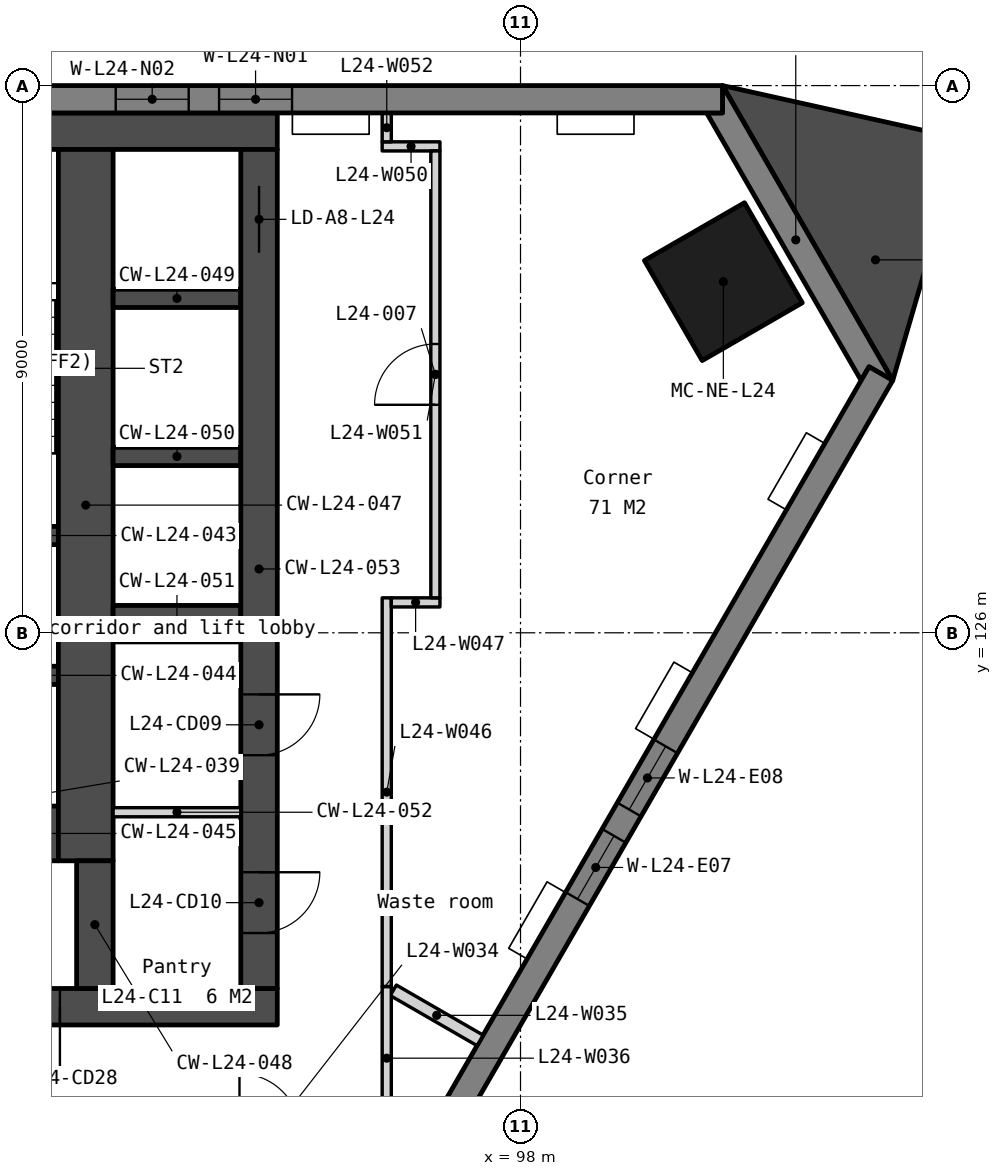
"""IFC4 building model, lengths in metres.
Left out: names, types, materials, properties, quantities, classifications, styles, units other than length and angle.
Written with IfcOpenShell. Run it as: python <this file> out.ifc"""

import sys

from ifc_helpers import new_model, si_unit, direction, frame, frame_2d, origin, origin_2d, place, context, subcontext, project, spatial, polyline, rectangle, outline, extrude, element, fill, save


model = new_model("IFC4")
c1 = context("Model", 3, precision=1e-05, world=origin(), true_north=direction((0.0, 1.0)))
c2 = subcontext(c1, "Body", "Model", "MODEL_VIEW")
j1 = project(units=[si_unit("LENGTHUNIT", "METRE"), si_unit("PLANEANGLEUNIT", "RADIAN")], contexts=[c1])
p1 = place(None, origin())
s1 = spatial("IfcSite", under=j1, at=p1, CompositionType="ELEMENT")
p2 = place(p1, origin())
s2 = spatial("IfcBuilding", under=s1, at=p2, CompositionType="ELEMENT")
p3 = place(p2, frame((0.0, 0.0, 99.3)))
s3 = spatial("IfcBuildingStorey", under=s2, at=p3, CompositionType="ELEMENT", Elevation=99.3)
p4 = place(p3, frame((101.336, 131.775, 0.0), z_axis=(0.0, 0.0, 1.0), x_axis=(-0.5, 0.866025403784, 0.0)))
e1 = element("IfcColumn", 1, at=p4, inside=s3, PredefinedType="COLUMN", context=c2, shape_type="SweptSolid", body=[
    extrude(rectangle(XDim=1.9, YDim=1.9, at=origin_2d()), origin(), (0.0, 0.0, 1.0), 3.5),
])
p5 = place(p3, frame((66.0, 134.25, 0.0), z_axis=(0.0, 0.0, 1.0), x_axis=(1.0, 0.0, 0.0)))
e2 = element("IfcWall", 2, at=p5, inside=s3, PredefinedType="SOLIDWALL", context=c2, shape_type="SweptSolid", body=[
    extrude(rectangle(XDim=28.0, YDim=0.6, at=frame_2d((14.0, 0.0))), origin(), (0.0, 0.0, 1.0), 3.35),
])
p6 = place(p3, frame((66.0, 119.85, 0.0), z_axis=(0.0, 0.0, 1.0), x_axis=(1.0, 0.0, 0.0)))
e3 = element("IfcWall", 3, at=p6, inside=s3, PredefinedType="SOLIDWALL", context=c2, shape_type="SweptSolid", body=[
    extrude(rectangle(XDim=28.0, YDim=0.6, at=frame_2d((14.0, 0.0))), origin(), (0.0, 0.0, 1.0), 3.35),
])
p7 = place(p6, frame((6.825, 0.0, 0.0)))
e4 = element("IfcOpeningElement", 4, at=p7, cuts=e3, PredefinedType="OPENING", context=c2, shape_type="SweptSolid", body=[
    extrude(rectangle(XDim=1.8, YDim=2.1, at=frame_2d((0.9, 1.05))), frame((0.0, 0.31, 0.0), z_axis=(0.0, -1.0, 0.0), x_axis=(1.0, 0.0, 0.0)), (0.0, 0.0, 1.0), 0.62),
])
p8 = place(p6, frame((15.85, 0.0, 0.0)))
e5 = element("IfcOpeningElement", 5, at=p8, cuts=e3, PredefinedType="OPENING", context=c2, shape_type="SweptSolid", body=[
    extrude(rectangle(XDim=1.5, YDim=2.1, at=frame_2d((0.75, 1.05))), frame((0.0, 0.31, 0.0), z_axis=(0.0, -1.0, 0.0), x_axis=(1.0, 0.0, 0.0)), (0.0, 0.0, 1.0), 0.62),
])
p9 = place(p6, frame((19.375, 0.0, 0.0)))
e6 = element("IfcOpeningElement", 6, at=p9, cuts=e3, PredefinedType="OPENING", context=c2, shape_type="SweptSolid", body=[
    extrude(rectangle(XDim=1.8, YDim=2.1, at=frame_2d((0.9, 1.05))), frame((0.0, 0.31, 0.0), z_axis=(0.0, -1.0, 0.0), x_axis=(1.0, 0.0, 0.0)), (0.0, 0.0, 1.0), 0.62),
])
p10 = place(p6, frame((4.425, 0.0, 0.0)))
e7 = element("IfcOpeningElement", 7, at=p10, cuts=e3, PredefinedType="OPENING", context=c2, shape_type="SweptSolid", body=[
    extrude(rectangle(XDim=1.0, YDim=2.1, at=frame_2d((0.5, 1.05))), frame((0.0, 0.31, 0.0), z_axis=(0.0, -1.0, 0.0), x_axis=(1.0, 0.0, 0.0)), (0.0, 0.0, 1.0), 0.62),
])
p11 = place(p6, frame((9.925, 0.0, 0.0)))
e8 = element("IfcOpeningElement", 8, at=p11, cuts=e3, PredefinedType="OPENING", context=c2, shape_type="SweptSolid", body=[
    extrude(rectangle(XDim=1.0, YDim=2.1, at=frame_2d((0.5, 1.05))), frame((0.0, 0.31, 0.0), z_axis=(0.0, -1.0, 0.0), x_axis=(1.0, 0.0, 0.0)), (0.0, 0.0, 1.0), 0.62),
])
p12 = place(p6, frame((13.125, 0.0, 0.0)))
e9 = element("IfcOpeningElement", 9, at=p12, cuts=e3, PredefinedType="OPENING", context=c2, shape_type="SweptSolid", body=[
    extrude(rectangle(XDim=1.0, YDim=2.1, at=frame_2d((0.5, 1.05))), frame((0.0, 0.31, 0.0), z_axis=(0.0, -1.0, 0.0), x_axis=(1.0, 0.0, 0.0)), (0.0, 0.0, 1.0), 0.62),
])
p13 = place(p6, frame((21.725, 0.0, 0.0)))
e10 = element("IfcOpeningElement", 10, at=p13, cuts=e3, PredefinedType="OPENING", context=c2, shape_type="SweptSolid", body=[
    extrude(rectangle(XDim=1.0, YDim=2.1, at=frame_2d((0.5, 1.05))), frame((0.0, 0.31, 0.0), z_axis=(0.0, -1.0, 0.0), x_axis=(1.0, 0.0, 0.0)), (0.0, 0.0, 1.0), 0.62),
])
p14 = place(p6, frame((23.425, 0.0, 0.0)))
e11 = element("IfcOpeningElement", 11, at=p14, cuts=e3, PredefinedType="OPENING", context=c2, shape_type="SweptSolid", body=[
    extrude(rectangle(XDim=1.0, YDim=2.1, at=frame_2d((0.5, 1.05))), frame((0.0, 0.31, 0.0), z_axis=(0.0, -1.0, 0.0), x_axis=(1.0, 0.0, 0.0)), (0.0, 0.0, 1.0), 0.62),
])
for number, where, z_axis, x_axis in (
    (12, (87.85, 127.6, 0.0), (0.0, 0.0, 1.0), (1.0, 0.0, 0.0)),
    (13, (87.85, 125.3, 0.0), (0.0, 0.0, 1.0), (1.0, 0.0, 0.0)),
):
    element("IfcWall", number, at=place(p3, frame(where, z_axis=z_axis, x_axis=x_axis)), inside=s3, PredefinedType="SOLIDWALL", context=c2, shape_type="SweptSolid", body=[
        extrude(rectangle(XDim=2.55, YDim=0.3, at=frame_2d((1.275, 0.0))), origin(), (0.0, 0.0, 1.0), 3.35),
    ])
p15 = place(p3, frame((87.85, 122.7, 0.0), z_axis=(0.0, 0.0, 1.0), x_axis=(1.0, 0.0, 0.0)))
e14 = element("IfcWall", 14, at=p15, inside=s3, PredefinedType="SOLIDWALL", context=c2, shape_type="SweptSolid", body=[
    extrude(rectangle(XDim=2.55, YDim=0.9, at=frame_2d((1.275, 0.0))), origin(), (0.0, 0.0, 1.0), 3.35),
])
p16 = place(p3, frame((90.85, 133.95, 0.0), z_axis=(0.0, 0.0, 1.0), x_axis=(0.0, -1.0, 0.0)))
e15 = element("IfcWall", 15, at=p16, inside=s3, PredefinedType="SOLIDWALL", context=c2, shape_type="SweptSolid", body=[
    extrude(rectangle(XDim=11.7, YDim=0.9, at=frame_2d((5.85, 0.0))), origin(), (0.0, 0.0, 1.0), 3.35),
])
p17 = place(p3, frame((91.0, 122.25, 0.0), z_axis=(0.0, 0.0, 1.0), x_axis=(0.0, -1.0, 0.0)))
e16 = element("IfcWall", 16, at=p17, inside=s3, PredefinedType="SOLIDWALL", context=c2, shape_type="SweptSolid", body=[
    extrude(rectangle(XDim=2.1, YDim=0.6, at=frame_2d((1.05, 0.0))), origin(), (0.0, 0.0, 1.0), 3.35),
])
for number, where, z_axis, x_axis in (
    (17, (91.3, 131.5, 0.0), (0.0, 0.0, 1.0), (1.0, 0.0, 0.0)),
    (18, (91.3, 128.9, 0.0), (0.0, 0.0, 1.0), (1.0, 0.0, 0.0)),
):
    element("IfcWall", number, at=place(p3, frame(where, z_axis=z_axis, x_axis=x_axis)), inside=s3, PredefinedType="SOLIDWALL", context=c2, shape_type="SweptSolid", body=[
        extrude(rectangle(XDim=2.1, YDim=0.3, at=frame_2d((1.05, 0.0))), origin(), (0.0, 0.0, 1.0), 3.35),
    ])
p18 = place(p3, frame((91.3, 126.15, 0.0), z_axis=(0.0, 0.0, 1.0), x_axis=(1.0, 0.0, 0.0)))
e19 = element("IfcWall", 19, at=p18, inside=s3, PredefinedType="SOLIDWALL", context=c2, shape_type="SweptSolid", body=[
    extrude(rectangle(XDim=2.1, YDim=0.6, at=frame_2d((1.05, 0.0))), origin(), (0.0, 0.0, 1.0), 3.35),
])
p19 = place(p3, frame((91.3, 123.049, 0.0), z_axis=(0.0, 0.0, 1.0), x_axis=(1.0, 0.0, 0.0)))
e20 = element("IfcWall", 20, at=p19, inside=s3, PredefinedType="PARTITIONING", context=c2, shape_type="SweptSolid", body=[
    extrude(rectangle(XDim=2.1, YDim=0.15, at=frame_2d((1.05, 0.0))), origin(), (0.0, 0.0, 1.0), 3.35),
])
p20 = place(p3, frame((93.7, 133.95, 0.0), z_axis=(0.0, 0.0, 1.0), x_axis=(0.0, -1.0, 0.0)))
e21 = element("IfcWall", 21, at=p20, inside=s3, PredefinedType="SOLIDWALL", context=c2, shape_type="SweptSolid", body=[
    extrude(rectangle(XDim=13.8, YDim=0.6, at=frame_2d((6.9, 0.0))), origin(), (0.0, 0.0, 1.0), 3.35),
])
p21 = place(p20, frame((0.6, 0.0, 0.0)))
e22 = element("IfcOpeningElement", 22, at=p21, cuts=e21, PredefinedType="OPENING", context=c2, shape_type="SweptSolid", body=[
    extrude(rectangle(XDim=1.1, YDim=2.1, at=frame_2d((0.55, 1.05))), frame((0.0, 0.31, 0.0), z_axis=(0.0, -1.0, 0.0), x_axis=(1.0, 0.0, 0.0)), (0.0, 0.0, 1.0), 0.62),
])
p22 = place(p20, frame((8.963, 0.0, 0.0)))
e23 = element("IfcOpeningElement", 23, at=p22, cuts=e21, PredefinedType="OPENING", context=c2, shape_type="SweptSolid", body=[
    extrude(rectangle(XDim=1.0, YDim=2.1, at=frame_2d((0.5, 1.05))), frame((0.0, 0.31, 0.0), z_axis=(0.0, -1.0, 0.0), x_axis=(1.0, 0.0, 0.0)), (0.0, 0.0, 1.0), 0.62),
])
p23 = place(p20, frame((11.888, 0.0, 0.0)))
e24 = element("IfcOpeningElement", 24, at=p23, cuts=e21, PredefinedType="OPENING", context=c2, shape_type="SweptSolid", body=[
    extrude(rectangle(XDim=1.0, YDim=2.1, at=frame_2d((0.5, 1.05))), frame((0.0, 0.31, 0.0), z_axis=(0.0, -1.0, 0.0), x_axis=(1.0, 0.0, 0.0)), (0.0, 0.0, 1.0), 0.62),
])
p24 = place(p3, frame((0.0, 0.0, -0.15)))
e25 = element("IfcWall", 25, at=p24, inside=s3, PredefinedType="SOLIDWALL", context=c2, shape_type="SweptSolid", body=[
    extrude(outline(polyline([(104.122, 130.15), (103.732, 130.375), (103.602, 130.15), (101.062, 134.55), (101.322, 134.55), (101.322, 135.0), (104.122, 130.15)])), origin(), (0.0, 0.0, 1.0), 3.5),
])
p25 = place(p3, frame((101.322, 134.775, -0.15), z_axis=(0.0, 0.0, 1.0), x_axis=(-1.0, 0.0, 0.0)))
e26 = element("IfcWall", 26, at=p25, inside=s3, PredefinedType="SOLIDWALL", context=c2, shape_type="SweptSolid", body=[
    extrude(outline(polyline([(42.643, 0.0), (42.643, 3.5), (0.0, 3.5), (0.0, 0.0), (42.643, 0.0)])), frame((0.0, 0.225, 0.0), z_axis=(0.0, -1.0, 0.0), x_axis=(1.0, 0.0, 0.0)), (0.0, 0.0, 1.0), 0.45),
])
p26 = place(p25, frame((7.079, 0.0, 1.05)))
e27 = element("IfcOpeningElement", 27, at=p26, cuts=e26, PredefinedType="OPENING", context=c2, shape_type="SweptSolid", body=[
    extrude(rectangle(XDim=1.2, YDim=1.5, at=frame_2d((0.6, 0.75))), frame((0.0, 0.235, 0.0), z_axis=(0.0, -1.0, 0.0), x_axis=(1.0, 0.0, 0.0)), (0.0, 0.0, 1.0), 0.47),
])
p27 = place(p25, frame((8.779, 0.0, 1.05)))
e28 = element("IfcOpeningElement", 28, at=p27, cuts=e26, PredefinedType="OPENING", context=c2, shape_type="SweptSolid", body=[
    extrude(rectangle(XDim=1.2, YDim=1.5, at=frame_2d((0.6, 0.75))), frame((0.0, 0.235, 0.0), z_axis=(0.0, -1.0, 0.0), x_axis=(1.0, 0.0, 0.0)), (0.0, 0.0, 1.0), 0.47),
])
p28 = place(p25, frame((15.607, 0.0, 1.05)))
e29 = element("IfcOpeningElement", 29, at=p28, cuts=e26, PredefinedType="OPENING", context=c2, shape_type="SweptSolid", body=[
    extrude(rectangle(XDim=1.2, YDim=1.5, at=frame_2d((0.6, 0.75))), frame((0.0, 0.235, 0.0), z_axis=(0.0, -1.0, 0.0), x_axis=(1.0, 0.0, 0.0)), (0.0, 0.0, 1.0), 0.47),
])
p29 = place(p25, frame((17.307, 0.0, 1.05)))
e30 = element("IfcOpeningElement", 30, at=p29, cuts=e26, PredefinedType="OPENING", context=c2, shape_type="SweptSolid", body=[
    extrude(rectangle(XDim=1.2, YDim=1.5, at=frame_2d((0.6, 0.75))), frame((0.0, 0.235, 0.0), z_axis=(0.0, -1.0, 0.0), x_axis=(1.0, 0.0, 0.0)), (0.0, 0.0, 1.0), 0.47),
])
p30 = place(p25, frame((24.136, 0.0, 1.05)))
e31 = element("IfcOpeningElement", 31, at=p30, cuts=e26, PredefinedType="OPENING", context=c2, shape_type="SweptSolid", body=[
    extrude(rectangle(XDim=1.2, YDim=1.5, at=frame_2d((0.6, 0.75))), frame((0.0, 0.235, 0.0), z_axis=(0.0, -1.0, 0.0), x_axis=(1.0, 0.0, 0.0)), (0.0, 0.0, 1.0), 0.47),
])
p31 = place(p25, frame((25.836, 0.0, 1.05)))
e32 = element("IfcOpeningElement", 32, at=p31, cuts=e26, PredefinedType="OPENING", context=c2, shape_type="SweptSolid", body=[
    extrude(rectangle(XDim=1.2, YDim=1.5, at=frame_2d((0.6, 0.75))), frame((0.0, 0.235, 0.0), z_axis=(0.0, -1.0, 0.0), x_axis=(1.0, 0.0, 0.0)), (0.0, 0.0, 1.0), 0.47),
])
p32 = place(p25, frame((32.665, 0.0, 1.05)))
e33 = element("IfcOpeningElement", 33, at=p32, cuts=e26, PredefinedType="OPENING", context=c2, shape_type="SweptSolid", body=[
    extrude(rectangle(XDim=1.2, YDim=1.5, at=frame_2d((0.6, 0.75))), frame((0.0, 0.235, 0.0), z_axis=(0.0, -1.0, 0.0), x_axis=(1.0, 0.0, 0.0)), (0.0, 0.0, 1.0), 0.47),
])
p33 = place(p25, frame((34.365, 0.0, 1.05)))
e34 = element("IfcOpeningElement", 34, at=p33, cuts=e26, PredefinedType="OPENING", context=c2, shape_type="SweptSolid", body=[
    extrude(rectangle(XDim=1.2, YDim=1.5, at=frame_2d((0.6, 0.75))), frame((0.0, 0.235, 0.0), z_axis=(0.0, -1.0, 0.0), x_axis=(1.0, 0.0, 0.0)), (0.0, 0.0, 1.0), 0.47),
])
p34 = place(p3, frame((82.605, 93.333, -0.15), z_axis=(0.0, 0.0, 1.0), x_axis=(0.500000478905, 0.866025127289, 0.0)))
e35 = element("IfcWall", 35, at=p34, inside=s3, PredefinedType="SOLIDWALL", context=c2, shape_type="SweptSolid", body=[
    extrude(outline(polyline([(42.643, 0.0), (42.643, 3.5), (0.0, 3.5), (0.0, 0.0), (42.643, 0.0)])), frame((0.0, 0.225, 0.0), z_axis=(0.0, -1.0, 0.0), x_axis=(1.0, 0.0, 0.0)), (0.0, 0.0, 1.0), 0.45),
])
p35 = place(p34, frame((7.079, 0.0, 1.05)))
e36 = element("IfcOpeningElement", 36, at=p35, cuts=e35, PredefinedType="OPENING", context=c2, shape_type="SweptSolid", body=[
    extrude(rectangle(XDim=1.2, YDim=1.5, at=frame_2d((0.6, 0.75))), frame((0.0, 0.235, 0.0), z_axis=(0.0, -1.0, 0.0), x_axis=(1.0, 0.0, 0.0)), (0.0, 0.0, 1.0), 0.47),
])
p36 = place(p34, frame((8.779, 0.0, 1.05)))
e37 = element("IfcOpeningElement", 37, at=p36, cuts=e35, PredefinedType="OPENING", context=c2, shape_type="SweptSolid", body=[
    extrude(rectangle(XDim=1.2, YDim=1.5, at=frame_2d((0.6, 0.75))), frame((0.0, 0.235, 0.0), z_axis=(0.0, -1.0, 0.0), x_axis=(1.0, 0.0, 0.0)), (0.0, 0.0, 1.0), 0.47),
])
p37 = place(p34, frame((15.607, 0.0, 1.05)))
e38 = element("IfcOpeningElement", 38, at=p37, cuts=e35, PredefinedType="OPENING", context=c2, shape_type="SweptSolid", body=[
    extrude(rectangle(XDim=1.2, YDim=1.5, at=frame_2d((0.6, 0.75))), frame((0.0, 0.235, 0.0), z_axis=(0.0, -1.0, 0.0), x_axis=(1.0, 0.0, 0.0)), (0.0, 0.0, 1.0), 0.47),
])
p38 = place(p34, frame((17.307, 0.0, 1.05)))
e39 = element("IfcOpeningElement", 39, at=p38, cuts=e35, PredefinedType="OPENING", context=c2, shape_type="SweptSolid", body=[
    extrude(rectangle(XDim=1.2, YDim=1.5, at=frame_2d((0.6, 0.75))), frame((0.0, 0.235, 0.0), z_axis=(0.0, -1.0, 0.0), x_axis=(1.0, 0.0, 0.0)), (0.0, 0.0, 1.0), 0.47),
])
p39 = place(p34, frame((24.136, 0.0, 1.05)))
e40 = element("IfcOpeningElement", 40, at=p39, cuts=e35, PredefinedType="OPENING", context=c2, shape_type="SweptSolid", body=[
    extrude(rectangle(XDim=1.2, YDim=1.5, at=frame_2d((0.6, 0.75))), frame((0.0, 0.235, 0.0), z_axis=(0.0, -1.0, 0.0), x_axis=(1.0, 0.0, 0.0)), (0.0, 0.0, 1.0), 0.47),
])
p40 = place(p34, frame((25.836, 0.0, 1.05)))
e41 = element("IfcOpeningElement", 41, at=p40, cuts=e35, PredefinedType="OPENING", context=c2, shape_type="SweptSolid", body=[
    extrude(rectangle(XDim=1.2, YDim=1.5, at=frame_2d((0.6, 0.75))), frame((0.0, 0.235, 0.0), z_axis=(0.0, -1.0, 0.0), x_axis=(1.0, 0.0, 0.0)), (0.0, 0.0, 1.0), 0.47),
])
p41 = place(p34, frame((32.665, 0.0, 1.05)))
e42 = element("IfcOpeningElement", 42, at=p41, cuts=e35, PredefinedType="OPENING", context=c2, shape_type="SweptSolid", body=[
    extrude(rectangle(XDim=1.2, YDim=1.5, at=frame_2d((0.6, 0.75))), frame((0.0, 0.235, 0.0), z_axis=(0.0, -1.0, 0.0), x_axis=(1.0, 0.0, 0.0)), (0.0, 0.0, 1.0), 0.47),
])
p42 = place(p34, frame((34.365, 0.0, 1.05)))
e43 = element("IfcOpeningElement", 43, at=p42, cuts=e35, PredefinedType="OPENING", context=c2, shape_type="SweptSolid", body=[
    extrude(rectangle(XDim=1.2, YDim=1.5, at=frame_2d((0.6, 0.75))), frame((0.0, 0.235, 0.0), z_axis=(0.0, -1.0, 0.0), x_axis=(1.0, 0.0, 0.0)), (0.0, 0.0, 1.0), 0.47),
])
p43 = place(p3, frame((0.0, 0.0, -0.15)))
e44 = element("IfcWall", 44, at=p43, inside=s3, PredefinedType="SOLIDWALL", context=c2, shape_type="SweptSolid", body=[
    extrude(outline(polyline([(104.122, 130.15), (105.279, 134.117), (101.322, 135.0), (104.122, 130.15)])), origin(), (0.0, 0.0, 1.0), 3.5),
])
p44 = place(p3, frame((95.908, 120.12, 0.0), z_axis=(0.0, 0.0, 1.0), x_axis=(0.866101713734, -0.499867803992, 0.0)))
e45 = element("IfcWall", 45, at=p44, inside=s3, PredefinedType="PARTITIONING", context=c2, shape_type="SweptSolid", body=[
    extrude(rectangle(XDim=1.648, YDim=0.2, at=frame_2d((0.824, 0.0))), origin(), (0.0, 0.0, 1.0), 3.35),
])
p45 = place(p3, frame((95.8, 117.825, 0.0), z_axis=(0.0, 0.0, 1.0), x_axis=(0.0, 1.0, 0.0)))
e46 = element("IfcWall", 46, at=p45, inside=s3, PredefinedType="PARTITIONING", context=c2, shape_type="SweptSolid", body=[
    extrude(rectangle(XDim=2.358, YDim=0.15, at=frame_2d((1.179, 0.0))), origin(), (0.0, 0.0, 1.0), 3.35),
])
p46 = place(p3, frame((95.8, 120.183, 0.0), z_axis=(0.0, 0.0, 1.0), x_axis=(0.0, 1.0, 0.0)))
e47 = element("IfcWall", 47, at=p46, inside=s3, PredefinedType="PARTITIONING", context=c2, shape_type="SweptSolid", body=[
    extrude(rectangle(XDim=6.392, YDim=0.15, at=frame_2d((3.196, 0.0))), origin(), (0.0, 0.0, 1.0), 3.35),
])
p47 = place(p3, frame((95.875, 126.5, 0.0), z_axis=(0.0, 0.0, 1.0), x_axis=(1.0, 0.0, 0.0)))
e48 = element("IfcWall", 48, at=p47, inside=s3, PredefinedType="PARTITIONING", context=c2, shape_type="SweptSolid", body=[
    extrude(rectangle(XDim=0.8, YDim=0.15, at=frame_2d((0.4, 0.0))), origin(), (0.0, 0.0, 1.0), 3.35),
])
p48 = place(p3, frame((95.725, 134.0, 0.0), z_axis=(0.0, 0.0, 1.0), x_axis=(1.0, 0.0, 0.0)))
e49 = element("IfcWall", 49, at=p48, inside=s3, PredefinedType="PARTITIONING", context=c2, shape_type="SweptSolid", body=[
    extrude(rectangle(XDim=0.95, YDim=0.15, at=frame_2d((0.475, 0.0))), origin(), (0.0, 0.0, 1.0), 2.886),
])
p49 = place(p3, frame((96.6, 126.575, 0.0), z_axis=(0.0, 0.0, 1.0), x_axis=(0.0, 1.0, 0.0)))
e50 = element("IfcWall", 50, at=p49, inside=s3, PredefinedType="PARTITIONING", context=c2, shape_type="SweptSolid", body=[
    extrude(rectangle(XDim=7.35, YDim=0.15, at=frame_2d((3.675, 0.0))), origin(), (0.0, 0.0, 1.0), 3.35),
])
p50 = place(p49, frame((3.175, 0.0, 0.0)))
e51 = element("IfcOpeningElement", 51, at=p50, cuts=e50, PredefinedType="OPENING", context=c2, shape_type="SweptSolid", body=[
    extrude(rectangle(XDim=1.0, YDim=2.1, at=frame_2d((0.5, 1.05))), frame((0.0, 0.085, 0.0), z_axis=(0.0, -1.0, 0.0), x_axis=(1.0, 0.0, 0.0)), (0.0, 0.0, 1.0), 0.17),
])
p51 = place(p3, frame((95.8, 134.075, 0.0), z_axis=(0.0, 0.0, 1.0), x_axis=(0.0, 1.0, 0.0)))
e52 = element("IfcWall", 52, at=p51, inside=s3, PredefinedType="PARTITIONING", context=c2, shape_type="SweptSolid", body=[
    extrude(rectangle(XDim=0.465, YDim=0.15, at=frame_2d((0.232, 0.0))), origin(), (0.0, 0.0, 1.0), 3.35),
])
p52 = place(p21, origin())
e53 = element("IfcDoor", 53, at=p52, inside=s3, OperationType="SLIDING_TO_LEFT", PredefinedType="DOOR", context=c2, shape_type="SweptSolid", body=[
    extrude(rectangle(XDim=1.1, YDim=2.1, at=frame_2d((0.55, 1.05))), frame((0.0, 0.025, 0.0), z_axis=(0.0, -1.0, 0.0), x_axis=(1.0, 0.0, 0.0)), (0.0, 0.0, 1.0), 0.05),
])
fill(e22, e53)
p53 = place(p22, origin())
e54 = element("IfcDoor", 54, at=p53, inside=s3, OperationType="SINGLE_SWING_LEFT", PredefinedType="DOOR", context=c2, shape_type="SweptSolid", body=[
    extrude(rectangle(XDim=1.0, YDim=2.1, at=frame_2d((0.5, 1.05))), frame((0.0, 0.025, 0.0), z_axis=(0.0, -1.0, 0.0), x_axis=(1.0, 0.0, 0.0)), (0.0, 0.0, 1.0), 0.05),
])
fill(e23, e54)
p54 = place(p23, origin())
e55 = element("IfcDoor", 55, at=p54, inside=s3, OperationType="SINGLE_SWING_LEFT", PredefinedType="DOOR", context=c2, shape_type="SweptSolid", body=[
    extrude(rectangle(XDim=1.0, YDim=2.1, at=frame_2d((0.5, 1.05))), frame((0.0, 0.025, 0.0), z_axis=(0.0, -1.0, 0.0), x_axis=(1.0, 0.0, 0.0)), (0.0, 0.0, 1.0), 0.05),
])
fill(e24, e55)
p55 = place(p14, origin())
e56 = element("IfcDoor", 56, at=p55, inside=s3, OperationType="SINGLE_SWING_RIGHT", PredefinedType="DOOR", context=c2, shape_type="SweptSolid", body=[
    extrude(rectangle(XDim=1.0, YDim=2.1, at=frame_2d((0.5, 1.05))), frame((0.0, 0.025, 0.0), z_axis=(0.0, -1.0, 0.0), x_axis=(1.0, 0.0, 0.0)), (0.0, 0.0, 1.0), 0.05),
])
fill(e11, e56)
p56 = place(p26, origin())
e57 = element("IfcWindow", 57, at=p56, inside=s3, PartitioningType="SINGLE_PANEL", PredefinedType="WINDOW", context=c2, shape_type="SweptSolid", body=[
    extrude(rectangle(XDim=1.2, YDim=1.5, at=frame_2d((0.6, 0.75))), frame((0.0, 0.03, 0.0), z_axis=(0.0, -1.0, 0.0), x_axis=(1.0, 0.0, 0.0)), (0.0, 0.0, 1.0), 0.06),
])
fill(e27, e57)
p57 = place(p27, origin())
e58 = element("IfcWindow", 58, at=p57, inside=s3, PartitioningType="SINGLE_PANEL", PredefinedType="WINDOW", context=c2, shape_type="SweptSolid", body=[
    extrude(rectangle(XDim=1.2, YDim=1.5, at=frame_2d((0.6, 0.75))), frame((0.0, 0.03, 0.0), z_axis=(0.0, -1.0, 0.0), x_axis=(1.0, 0.0, 0.0)), (0.0, 0.0, 1.0), 0.06),
])
fill(e28, e58)
p58 = place(p41, origin())
e59 = element("IfcWindow", 59, at=p58, inside=s3, PartitioningType="SINGLE_PANEL", PredefinedType="WINDOW", context=c2, shape_type="SweptSolid", body=[
    extrude(rectangle(XDim=1.2, YDim=1.5, at=frame_2d((0.6, 0.75))), frame((0.0, 0.03, 0.0), z_axis=(0.0, -1.0, 0.0), x_axis=(1.0, 0.0, 0.0)), (0.0, 0.0, 1.0), 0.06),
])
fill(e42, e59)
p59 = place(p42, origin())
e60 = element("IfcWindow", 60, at=p59, inside=s3, PartitioningType="SINGLE_PANEL", PredefinedType="WINDOW", context=c2, shape_type="SweptSolid", body=[
    extrude(rectangle(XDim=1.2, YDim=1.5, at=frame_2d((0.6, 0.75))), frame((0.0, 0.03, 0.0), z_axis=(0.0, -1.0, 0.0), x_axis=(1.0, 0.0, 0.0)), (0.0, 0.0, 1.0), 0.06),
])
fill(e43, e60)
p60 = place(p50, origin())
e61 = element("IfcDoor", 61, at=p60, inside=s3, OperationType="SINGLE_SWING_LEFT", PredefinedType="DOOR", context=c2, shape_type="SweptSolid", body=[
    extrude(rectangle(XDim=1.0, YDim=2.1, at=frame_2d((0.5, 1.05))), frame((0.0, 0.025, 0.0), z_axis=(0.0, -1.0, 0.0), x_axis=(1.0, 0.0, 0.0)), (0.0, 0.0, 1.0), 0.05),
])
fill(e51, e61)
save(model, sys.argv[1])
